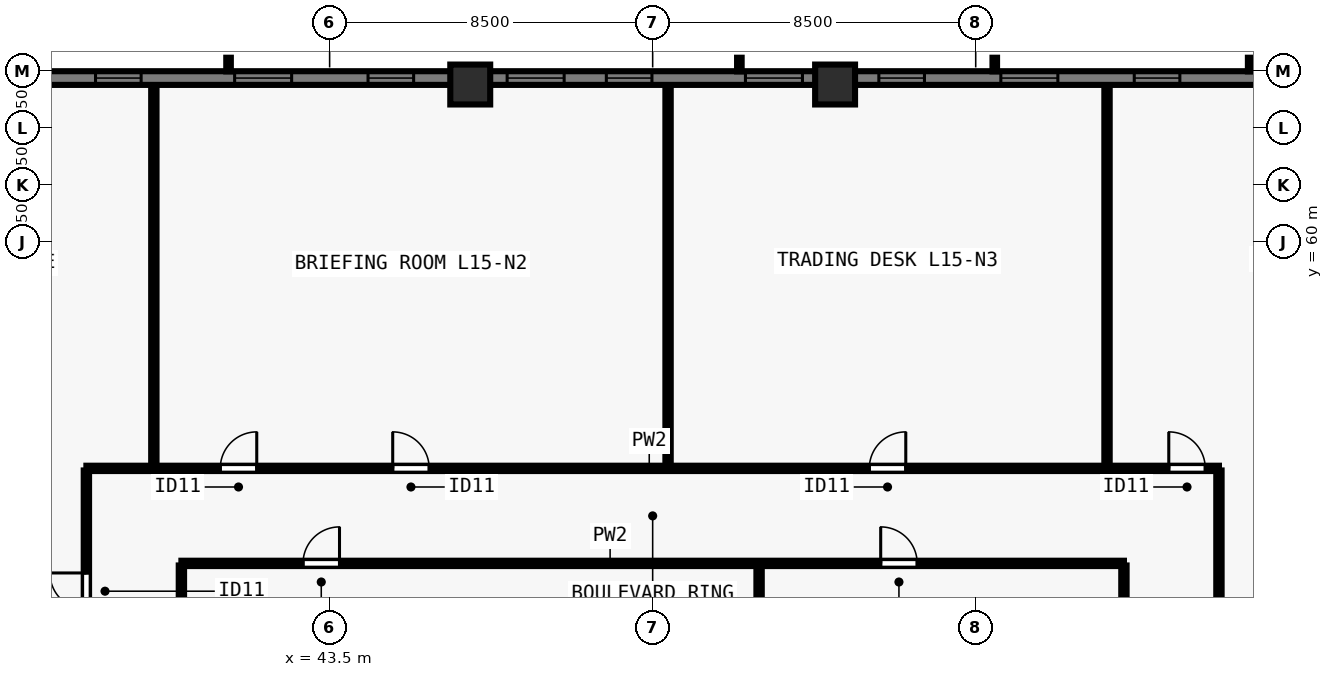
"""IFC4 building model, lengths in metres.
Left out: names, types, materials, properties, quantities, classifications, styles, units other than length and angle.
Written with IfcOpenShell. Run it as: python <this file> out.ifc"""

import sys

from ifc_helpers import new_model, si_unit, direction, frame, frame_2d, origin, origin_2d, place, context, subcontext, project, spatial, rectangle, extrude, element, fill, save


model = new_model("IFC4")
c1 = context("Model", 3, precision=1e-05, world=origin(), true_north=direction((0.0, 1.0)))
c2 = subcontext(c1, "Body", "Model", "MODEL_VIEW")
j1 = project(units=[si_unit("LENGTHUNIT", "METRE"), si_unit("PLANEANGLEUNIT", "RADIAN")], contexts=[c1])
p1 = place(None, origin())
s1 = spatial("IfcSite", under=j1, at=p1, CompositionType="ELEMENT")
p2 = place(p1, origin())
s2 = spatial("IfcBuilding", under=s1, at=p2, CompositionType="ELEMENT")
p3 = place(p2, frame((0.0, 0.0, 58.5)))
s3 = spatial("IfcBuildingStorey", under=s2, at=p3, CompositionType="ELEMENT", Elevation=58.5)
for number, where, z_axis, x_axis in (
    (1, (56.8, 64.15, 0.0), (0.0, 0.0, 1.0), (1.0, 0.0, 0.0)),
    (2, (47.2, 64.15, 0.0), (0.0, 0.0, 1.0), (1.0, 0.0, 0.0)),
):
    element("IfcColumn", number, at=place(p3, frame(where, z_axis=z_axis, x_axis=x_axis)), inside=s3, PredefinedType="COLUMN", context=c2, shape_type="SweptSolid", body=[
        extrude(rectangle(XDim=1.05, YDim=1.05, at=origin_2d()), origin(), (0.0, 0.0, 1.0), 3.5),
    ])
p4 = place(p3, frame((29.5, 64.32, 0.0), z_axis=(0.0, 0.0, 1.0), x_axis=(1.0, 0.0, 0.0)))
e3 = element("IfcWall", 3, at=p4, inside=s3, PredefinedType="SOLIDWALL", context=c2, shape_type="SweptSolid", body=[
    extrude(rectangle(XDim=44.662, YDim=0.36, at=frame_2d((22.331, 0.0))), origin(), (0.0, 0.0, 1.0), 3.28),
])
p5 = place(p4, frame((4.78, 0.0, 0.8)))
e4 = element("IfcOpeningElement", 4, at=p5, cuts=e3, PredefinedType="OPENING", context=c2, shape_type="SweptSolid", body=[
    extrude(rectangle(XDim=1.5, YDim=1.544, at=frame_2d((0.75, 0.772))), frame((0.0, 0.19, 0.0), z_axis=(0.0, -1.0, 0.0), x_axis=(1.0, 0.0, 0.0)), (0.0, 0.0, 1.0), 0.38),
])
p6 = place(p4, frame((7.84, 0.0, 0.8)))
e5 = element("IfcOpeningElement", 5, at=p6, cuts=e3, PredefinedType="OPENING", context=c2, shape_type="SweptSolid", body=[
    extrude(rectangle(XDim=1.2, YDim=1.544, at=frame_2d((0.6, 0.772))), frame((0.0, 0.19, 0.0), z_axis=(0.0, -1.0, 0.0), x_axis=(1.0, 0.0, 0.0)), (0.0, 0.0, 1.0), 0.38),
])
p7 = place(p4, frame((11.5, 0.0, 0.8)))
e6 = element("IfcOpeningElement", 6, at=p7, cuts=e3, PredefinedType="OPENING", context=c2, shape_type="SweptSolid", body=[
    extrude(rectangle(XDim=1.5, YDim=1.544, at=frame_2d((0.75, 0.772))), frame((0.0, 0.19, 0.0), z_axis=(0.0, -1.0, 0.0), x_axis=(1.0, 0.0, 0.0)), (0.0, 0.0, 1.0), 0.38),
])
p8 = place(p4, frame((15.01, 0.0, 0.8)))
e7 = element("IfcOpeningElement", 7, at=p8, cuts=e3, PredefinedType="OPENING", context=c2, shape_type="SweptSolid", body=[
    extrude(rectangle(XDim=1.2, YDim=1.544, at=frame_2d((0.6, 0.772))), frame((0.0, 0.19, 0.0), z_axis=(0.0, -1.0, 0.0), x_axis=(1.0, 0.0, 0.0)), (0.0, 0.0, 1.0), 0.38),
])
p9 = place(p4, frame((18.671, 0.0, 0.8)))
e8 = element("IfcOpeningElement", 8, at=p9, cuts=e3, PredefinedType="OPENING", context=c2, shape_type="SweptSolid", body=[
    extrude(rectangle(XDim=1.5, YDim=1.544, at=frame_2d((0.75, 0.772))), frame((0.0, 0.19, 0.0), z_axis=(0.0, -1.0, 0.0), x_axis=(1.0, 0.0, 0.0)), (0.0, 0.0, 1.0), 0.38),
])
p10 = place(p4, frame((21.281, 0.0, 0.8)))
e9 = element("IfcOpeningElement", 9, at=p10, cuts=e3, PredefinedType="OPENING", context=c2, shape_type="SweptSolid", body=[
    extrude(rectangle(XDim=1.2, YDim=1.544, at=frame_2d((0.6, 0.772))), frame((0.0, 0.19, 0.0), z_axis=(0.0, -1.0, 0.0), x_axis=(1.0, 0.0, 0.0)), (0.0, 0.0, 1.0), 0.38),
])
p11 = place(p4, frame((24.941, 0.0, 0.8)))
e10 = element("IfcOpeningElement", 10, at=p11, cuts=e3, PredefinedType="OPENING", context=c2, shape_type="SweptSolid", body=[
    extrude(rectangle(XDim=1.5, YDim=1.544, at=frame_2d((0.75, 0.772))), frame((0.0, 0.19, 0.0), z_axis=(0.0, -1.0, 0.0), x_axis=(1.0, 0.0, 0.0)), (0.0, 0.0, 1.0), 0.38),
])
p12 = place(p4, frame((28.451, 0.0, 0.8)))
e11 = element("IfcOpeningElement", 11, at=p12, cuts=e3, PredefinedType="OPENING", context=c2, shape_type="SweptSolid", body=[
    extrude(rectangle(XDim=1.2, YDim=1.544, at=frame_2d((0.6, 0.772))), frame((0.0, 0.19, 0.0), z_axis=(0.0, -1.0, 0.0), x_axis=(1.0, 0.0, 0.0)), (0.0, 0.0, 1.0), 0.38),
])
p13 = place(p4, frame((31.662, 0.0, 0.8)))
e12 = element("IfcOpeningElement", 12, at=p13, cuts=e3, PredefinedType="OPENING", context=c2, shape_type="SweptSolid", body=[
    extrude(rectangle(XDim=1.5, YDim=1.544, at=frame_2d((0.75, 0.772))), frame((0.0, 0.19, 0.0), z_axis=(0.0, -1.0, 0.0), x_axis=(1.0, 0.0, 0.0)), (0.0, 0.0, 1.0), 0.38),
])
p14 = place(p4, frame((35.172, 0.0, 0.8)))
e13 = element("IfcOpeningElement", 13, at=p14, cuts=e3, PredefinedType="OPENING", context=c2, shape_type="SweptSolid", body=[
    extrude(rectangle(XDim=1.2, YDim=1.544, at=frame_2d((0.6, 0.772))), frame((0.0, 0.19, 0.0), z_axis=(0.0, -1.0, 0.0), x_axis=(1.0, 0.0, 0.0)), (0.0, 0.0, 1.0), 0.38),
])
p15 = place(p4, frame((38.382, 0.0, 0.8)))
e14 = element("IfcOpeningElement", 14, at=p15, cuts=e3, PredefinedType="OPENING", context=c2, shape_type="SweptSolid", body=[
    extrude(rectangle(XDim=1.5, YDim=1.544, at=frame_2d((0.75, 0.772))), frame((0.0, 0.19, 0.0), z_axis=(0.0, -1.0, 0.0), x_axis=(1.0, 0.0, 0.0)), (0.0, 0.0, 1.0), 0.38),
])
p16 = place(p3, frame((37.1, 54.05, 0.0), z_axis=(0.0, 0.0, 1.0), x_axis=(1.0, 0.0, 0.0)))
e15 = element("IfcWall", 15, at=p16, inside=s3, PredefinedType="PARTITIONING", context=c2, shape_type="SweptSolid", body=[
    extrude(rectangle(XDim=29.8, YDim=0.14, at=frame_2d((14.9, 0.0))), origin(), (0.0, 0.0, 1.0), 3.28),
])
p17 = place(p16, frame((3.522, 0.0, 0.0)))
e16 = element("IfcOpeningElement", 16, at=p17, cuts=e15, PredefinedType="OPENING", context=c2, shape_type="SweptSolid", body=[
    extrude(rectangle(XDim=0.96, YDim=2.12, at=frame_2d((0.48, 1.06))), frame((0.0, 0.08, 0.0), z_axis=(0.0, -1.0, 0.0), x_axis=(1.0, 0.0, 0.0)), (0.0, 0.0, 1.0), 0.16),
])
p18 = place(p16, frame((8.06, 0.0, 0.0)))
e17 = element("IfcOpeningElement", 17, at=p18, cuts=e15, PredefinedType="OPENING", context=c2, shape_type="SweptSolid", body=[
    extrude(rectangle(XDim=0.96, YDim=2.12, at=frame_2d((0.48, 1.06))), frame((0.0, 0.08, 0.0), z_axis=(0.0, -1.0, 0.0), x_axis=(1.0, 0.0, 0.0)), (0.0, 0.0, 1.0), 0.16),
])
p19 = place(p16, frame((20.6, 0.0, 0.0)))
e18 = element("IfcOpeningElement", 18, at=p19, cuts=e15, PredefinedType="OPENING", context=c2, shape_type="SweptSolid", body=[
    extrude(rectangle(XDim=0.96, YDim=2.12, at=frame_2d((0.48, 1.06))), frame((0.0, 0.08, 0.0), z_axis=(0.0, -1.0, 0.0), x_axis=(1.0, 0.0, 0.0)), (0.0, 0.0, 1.0), 0.16),
])
p20 = place(p16, frame((28.48, 0.0, 0.0)))
e19 = element("IfcOpeningElement", 19, at=p20, cuts=e15, PredefinedType="OPENING", context=c2, shape_type="SweptSolid", body=[
    extrude(rectangle(XDim=0.96, YDim=2.12, at=frame_2d((0.48, 1.06))), frame((0.0, 0.08, 0.0), z_axis=(0.0, -1.0, 0.0), x_axis=(1.0, 0.0, 0.0)), (0.0, 0.0, 1.0), 0.16),
])
p21 = place(p3, frame((37.1, 24.005, 0.0), z_axis=(0.0, 0.0, 1.0), x_axis=(0.0, 1.0, 0.0)))
e20 = element("IfcWall", 20, at=p21, inside=s3, PredefinedType="PARTITIONING", context=c2, shape_type="SweptSolid", body=[
    extrude(rectangle(XDim=29.99, YDim=0.14, at=frame_2d((14.995, 0.0))), origin(), (0.0, 0.0, 1.0), 3.28),
])
p22 = place(p21, frame((2.76, 0.0, 0.0)))
e21 = element("IfcOpeningElement", 21, at=p22, cuts=e20, PredefinedType="OPENING", context=c2, shape_type="SweptSolid", body=[
    extrude(rectangle(XDim=0.96, YDim=2.12, at=frame_2d((0.48, 1.06))), frame((0.0, 0.08, 0.0), z_axis=(0.0, -1.0, 0.0), x_axis=(1.0, 0.0, 0.0)), (0.0, 0.0, 1.0), 0.16),
])
p23 = place(p21, frame((8.598, 0.0, 0.0)))
e22 = element("IfcOpeningElement", 22, at=p23, cuts=e20, PredefinedType="OPENING", context=c2, shape_type="SweptSolid", body=[
    extrude(rectangle(XDim=0.96, YDim=2.12, at=frame_2d((0.48, 1.06))), frame((0.0, 0.08, 0.0), z_axis=(0.0, -1.0, 0.0), x_axis=(1.0, 0.0, 0.0)), (0.0, 0.0, 1.0), 0.16),
])
p24 = place(p21, frame((14.578, 0.0, 0.0)))
e23 = element("IfcOpeningElement", 23, at=p24, cuts=e20, PredefinedType="OPENING", context=c2, shape_type="SweptSolid", body=[
    extrude(rectangle(XDim=0.96, YDim=2.12, at=frame_2d((0.48, 1.06))), frame((0.0, 0.08, 0.0), z_axis=(0.0, -1.0, 0.0), x_axis=(1.0, 0.0, 0.0)), (0.0, 0.0, 1.0), 0.16),
])
p25 = place(p21, frame((20.558, 0.0, 0.0)))
e24 = element("IfcOpeningElement", 24, at=p25, cuts=e20, PredefinedType="OPENING", context=c2, shape_type="SweptSolid", body=[
    extrude(rectangle(XDim=0.96, YDim=2.12, at=frame_2d((0.48, 1.06))), frame((0.0, 0.08, 0.0), z_axis=(0.0, -1.0, 0.0), x_axis=(1.0, 0.0, 0.0)), (0.0, 0.0, 1.0), 0.16),
])
p26 = place(p21, frame((26.333, 0.0, 0.0)))
e25 = element("IfcOpeningElement", 25, at=p26, cuts=e20, PredefinedType="OPENING", context=c2, shape_type="SweptSolid", body=[
    extrude(rectangle(XDim=0.96, YDim=2.12, at=frame_2d((0.48, 1.06))), frame((0.0, 0.08, 0.0), z_axis=(0.0, -1.0, 0.0), x_axis=(1.0, 0.0, 0.0)), (0.0, 0.0, 1.0), 0.16),
])
p27 = place(p3, frame((66.9, 24.005, 0.0), z_axis=(0.0, 0.0, 1.0), x_axis=(0.0, 1.0, 0.0)))
e26 = element("IfcWall", 26, at=p27, inside=s3, PredefinedType="PARTITIONING", context=c2, shape_type="SweptSolid", body=[
    extrude(rectangle(XDim=29.99, YDim=0.14, at=frame_2d((14.995, 0.0))), origin(), (0.0, 0.0, 1.0), 3.28),
])
p28 = place(p27, frame((4.344, 0.0, 0.0)))
e27 = element("IfcOpeningElement", 27, at=p28, cuts=e26, PredefinedType="OPENING", context=c2, shape_type="SweptSolid", body=[
    extrude(rectangle(XDim=0.96, YDim=2.12, at=frame_2d((0.48, 1.06))), frame((0.0, 0.08, 0.0), z_axis=(0.0, -1.0, 0.0), x_axis=(1.0, 0.0, 0.0)), (0.0, 0.0, 1.0), 0.16),
])
p29 = place(p27, frame((14.452, 0.0, 0.0)))
e28 = element("IfcOpeningElement", 28, at=p29, cuts=e26, PredefinedType="OPENING", context=c2, shape_type="SweptSolid", body=[
    extrude(rectangle(XDim=0.96, YDim=2.12, at=frame_2d((0.48, 1.06))), frame((0.0, 0.08, 0.0), z_axis=(0.0, -1.0, 0.0), x_axis=(1.0, 0.0, 0.0)), (0.0, 0.0, 1.0), 0.16),
])
p30 = place(p27, frame((24.623, 0.0, 0.0)))
e29 = element("IfcOpeningElement", 29, at=p30, cuts=e26, PredefinedType="OPENING", context=c2, shape_type="SweptSolid", body=[
    extrude(rectangle(XDim=0.96, YDim=2.12, at=frame_2d((0.48, 1.06))), frame((0.0, 0.08, 0.0), z_axis=(0.0, -1.0, 0.0), x_axis=(1.0, 0.0, 0.0)), (0.0, 0.0, 1.0), 0.16),
])
p31 = place(p3, frame((39.6, 51.55, 0.0), z_axis=(0.0, 0.0, 1.0), x_axis=(1.0, 0.0, 0.0)))
e30 = element("IfcWall", 30, at=p31, inside=s3, PredefinedType="PARTITIONING", context=c2, shape_type="SweptSolid", body=[
    extrude(rectangle(XDim=24.8, YDim=0.14, at=frame_2d((12.4, 0.0))), origin(), (0.0, 0.0, 1.0), 3.28),
])
p32 = place(p31, frame((3.2, 0.0, 0.0)))
e31 = element("IfcOpeningElement", 31, at=p32, cuts=e30, PredefinedType="OPENING", context=c2, shape_type="SweptSolid", body=[
    extrude(rectangle(XDim=0.96, YDim=2.12, at=frame_2d((0.48, 1.06))), frame((0.0, 0.08, 0.0), z_axis=(0.0, -1.0, 0.0), x_axis=(1.0, 0.0, 0.0)), (0.0, 0.0, 1.0), 0.16),
])
p33 = place(p31, frame((18.4, 0.0, 0.0)))
e32 = element("IfcOpeningElement", 32, at=p33, cuts=e30, PredefinedType="OPENING", context=c2, shape_type="SweptSolid", body=[
    extrude(rectangle(XDim=0.96, YDim=2.12, at=frame_2d((0.48, 1.06))), frame((0.0, 0.08, 0.0), z_axis=(0.0, -1.0, 0.0), x_axis=(1.0, 0.0, 0.0)), (0.0, 0.0, 1.0), 0.16),
])
p34 = place(p3, frame((39.6, 40.8, 0.0), z_axis=(0.0, 0.0, 1.0), x_axis=(0.0, 1.0, 0.0)))
e33 = element("IfcWall", 33, at=p34, inside=s3, PredefinedType="PARTITIONING", context=c2, shape_type="SweptSolid", body=[
    extrude(rectangle(XDim=10.695, YDim=0.14, at=frame_2d((5.348, 0.0))), origin(), (0.0, 0.0, 1.0), 3.28),
])
p35 = place(p34, frame((2.5, 0.0, 0.0)))
e34 = element("IfcOpeningElement", 34, at=p35, cuts=e33, PredefinedType="OPENING", context=c2, shape_type="SweptSolid", body=[
    extrude(rectangle(XDim=0.88, YDim=2.1, at=frame_2d((0.44, 1.05))), frame((0.0, 0.08, 0.0), z_axis=(0.0, -1.0, 0.0), x_axis=(1.0, 0.0, 0.0)), (0.0, 0.0, 1.0), 0.16),
])
p36 = place(p3, frame((64.4, 40.8, 0.0), z_axis=(0.0, 0.0, 1.0), x_axis=(0.0, 1.0, 0.0)))
e35 = element("IfcWall", 35, at=p36, inside=s3, PredefinedType="PARTITIONING", context=c2, shape_type="SweptSolid", body=[
    extrude(rectangle(XDim=10.695, YDim=0.14, at=frame_2d((5.348, 0.0))), origin(), (0.0, 0.0, 1.0), 3.28),
])
p37 = place(p36, frame((2.5, 0.0, 0.0)))
e36 = element("IfcOpeningElement", 36, at=p37, cuts=e35, PredefinedType="OPENING", context=c2, shape_type="SweptSolid", body=[
    extrude(rectangle(XDim=0.88, YDim=2.1, at=frame_2d((0.44, 1.05))), frame((0.0, 0.08, 0.0), z_axis=(0.0, -1.0, 0.0), x_axis=(1.0, 0.0, 0.0)), (0.0, 0.0, 1.0), 0.16),
])
p38 = place(p3, frame((54.8, 47.76, 0.0), z_axis=(0.0, 0.0, 1.0), x_axis=(0.0, 1.0, 0.0)))
e37 = element("IfcWall", 37, at=p38, inside=s3, PredefinedType="PARTITIONING", context=c2, shape_type="SweptSolid", body=[
    extrude(rectangle(XDim=3.735, YDim=0.14, at=frame_2d((1.868, 0.0))), origin(), (0.0, 0.0, 1.0), 3.28),
])
p39 = place(p3, frame((38.875, 54.15, 0.0), z_axis=(0.0, 0.0, 1.0), x_axis=(0.0, 1.0, 0.0)))
e38 = element("IfcWall", 38, at=p39, inside=s3, PredefinedType="PARTITIONING", context=c2, shape_type="SweptSolid", body=[
    extrude(rectangle(XDim=9.93, YDim=0.14, at=frame_2d((4.965, 0.0))), origin(), (0.0, 0.0, 1.0), 3.28),
])
p40 = place(p3, frame((52.405, 54.15, 0.0), z_axis=(0.0, 0.0, 1.0), x_axis=(0.0, 1.0, 0.0)))
e39 = element("IfcWall", 39, at=p40, inside=s3, PredefinedType="PARTITIONING", context=c2, shape_type="SweptSolid", body=[
    extrude(rectangle(XDim=9.93, YDim=0.14, at=frame_2d((4.965, 0.0))), origin(), (0.0, 0.0, 1.0), 2.849),
])
p41 = place(p3, frame((63.955, 54.15, 0.0), z_axis=(0.0, 0.0, 1.0), x_axis=(0.0, 1.0, 0.0)))
e40 = element("IfcWall", 40, at=p41, inside=s3, PredefinedType="PARTITIONING", context=c2, shape_type="SweptSolid", body=[
    extrude(rectangle(XDim=9.93, YDim=0.14, at=frame_2d((4.965, 0.0))), origin(), (0.0, 0.0, 1.0), 3.28),
])
p42 = place(p6, origin())
e41 = element("IfcWindow", 41, at=p42, inside=s3, PartitioningType="SINGLE_PANEL", PredefinedType="WINDOW", context=c2, shape_type="SweptSolid", body=[
    extrude(rectangle(XDim=1.2, YDim=1.544, at=frame_2d((0.6, 0.772))), frame((0.0, -0.05, 0.0), z_axis=(0.0, -1.0, 0.0), x_axis=(1.0, 0.0, 0.0)), (0.0, 0.0, 1.0), 0.06),
])
fill(e5, e41)
p43 = place(p7, origin())
e42 = element("IfcWindow", 42, at=p43, inside=s3, PartitioningType="SINGLE_PANEL", PredefinedType="WINDOW", context=c2, shape_type="SweptSolid", body=[
    extrude(rectangle(XDim=1.5, YDim=1.544, at=frame_2d((0.75, 0.772))), frame((0.0, -0.05, 0.0), z_axis=(0.0, -1.0, 0.0), x_axis=(1.0, 0.0, 0.0)), (0.0, 0.0, 1.0), 0.06),
])
fill(e6, e42)
p44 = place(p8, origin())
e43 = element("IfcWindow", 43, at=p44, inside=s3, PartitioningType="SINGLE_PANEL", PredefinedType="WINDOW", context=c2, shape_type="SweptSolid", body=[
    extrude(rectangle(XDim=1.2, YDim=1.544, at=frame_2d((0.6, 0.772))), frame((0.0, -0.05, 0.0), z_axis=(0.0, -1.0, 0.0), x_axis=(1.0, 0.0, 0.0)), (0.0, 0.0, 1.0), 0.06),
])
fill(e7, e43)
p45 = place(p9, origin())
e44 = element("IfcWindow", 44, at=p45, inside=s3, PartitioningType="SINGLE_PANEL", PredefinedType="WINDOW", context=c2, shape_type="SweptSolid", body=[
    extrude(rectangle(XDim=1.5, YDim=1.544, at=frame_2d((0.75, 0.772))), frame((0.0, -0.05, 0.0), z_axis=(0.0, -1.0, 0.0), x_axis=(1.0, 0.0, 0.0)), (0.0, 0.0, 1.0), 0.06),
])
fill(e8, e44)
p46 = place(p10, origin())
e45 = element("IfcWindow", 45, at=p46, inside=s3, PartitioningType="SINGLE_PANEL", PredefinedType="WINDOW", context=c2, shape_type="SweptSolid", body=[
    extrude(rectangle(XDim=1.2, YDim=1.544, at=frame_2d((0.6, 0.772))), frame((0.0, -0.05, 0.0), z_axis=(0.0, -1.0, 0.0), x_axis=(1.0, 0.0, 0.0)), (0.0, 0.0, 1.0), 0.06),
])
fill(e9, e45)
p47 = place(p11, origin())
e46 = element("IfcWindow", 46, at=p47, inside=s3, PartitioningType="SINGLE_PANEL", PredefinedType="WINDOW", context=c2, shape_type="SweptSolid", body=[
    extrude(rectangle(XDim=1.5, YDim=1.544, at=frame_2d((0.75, 0.772))), frame((0.0, -0.05, 0.0), z_axis=(0.0, -1.0, 0.0), x_axis=(1.0, 0.0, 0.0)), (0.0, 0.0, 1.0), 0.06),
])
fill(e10, e46)
p48 = place(p12, origin())
e47 = element("IfcWindow", 47, at=p48, inside=s3, PartitioningType="SINGLE_PANEL", PredefinedType="WINDOW", context=c2, shape_type="SweptSolid", body=[
    extrude(rectangle(XDim=1.2, YDim=1.544, at=frame_2d((0.6, 0.772))), frame((0.0, -0.05, 0.0), z_axis=(0.0, -1.0, 0.0), x_axis=(1.0, 0.0, 0.0)), (0.0, 0.0, 1.0), 0.06),
])
fill(e11, e47)
p49 = place(p13, origin())
e48 = element("IfcWindow", 48, at=p49, inside=s3, PartitioningType="SINGLE_PANEL", PredefinedType="WINDOW", context=c2, shape_type="SweptSolid", body=[
    extrude(rectangle(XDim=1.5, YDim=1.544, at=frame_2d((0.75, 0.772))), frame((0.0, -0.05, 0.0), z_axis=(0.0, -1.0, 0.0), x_axis=(1.0, 0.0, 0.0)), (0.0, 0.0, 1.0), 0.06),
])
fill(e12, e48)
p50 = place(p14, origin())
e49 = element("IfcWindow", 49, at=p50, inside=s3, PartitioningType="SINGLE_PANEL", PredefinedType="WINDOW", context=c2, shape_type="SweptSolid", body=[
    extrude(rectangle(XDim=1.2, YDim=1.544, at=frame_2d((0.6, 0.772))), frame((0.0, -0.05, 0.0), z_axis=(0.0, -1.0, 0.0), x_axis=(1.0, 0.0, 0.0)), (0.0, 0.0, 1.0), 0.06),
])
fill(e13, e49)
p51 = place(p32, origin())
e50 = element("IfcDoor", 50, at=p51, inside=s3, OperationType="SINGLE_SWING_RIGHT", PredefinedType="DOOR", context=c2, shape_type="SweptSolid", body=[
    extrude(rectangle(XDim=0.96, YDim=2.12, at=frame_2d((0.48, 1.06))), frame((0.0, 0.025, 0.0), z_axis=(0.0, -1.0, 0.0), x_axis=(1.0, 0.0, 0.0)), (0.0, 0.0, 1.0), 0.05),
])
fill(e31, e50)
p52 = place(p33, origin())
e51 = element("IfcDoor", 51, at=p52, inside=s3, OperationType="SINGLE_SWING_LEFT", PredefinedType="DOOR", context=c2, shape_type="SweptSolid", body=[
    extrude(rectangle(XDim=0.96, YDim=2.12, at=frame_2d((0.48, 1.06))), frame((0.0, 0.025, 0.0), z_axis=(0.0, -1.0, 0.0), x_axis=(1.0, 0.0, 0.0)), (0.0, 0.0, 1.0), 0.05),
])
fill(e32, e51)
p53 = place(p17, origin())
e52 = element("IfcDoor", 52, at=p53, inside=s3, OperationType="SINGLE_SWING_RIGHT", PredefinedType="DOOR", context=c2, shape_type="SweptSolid", body=[
    extrude(rectangle(XDim=0.96, YDim=2.12, at=frame_2d((0.48, 1.06))), frame((0.0, 0.025, 0.0), z_axis=(0.0, -1.0, 0.0), x_axis=(1.0, 0.0, 0.0)), (0.0, 0.0, 1.0), 0.05),
])
fill(e16, e52)
p54 = place(p18, origin())
e53 = element("IfcDoor", 53, at=p54, inside=s3, OperationType="SINGLE_SWING_LEFT", PredefinedType="DOOR", context=c2, shape_type="SweptSolid", body=[
    extrude(rectangle(XDim=0.96, YDim=2.12, at=frame_2d((0.48, 1.06))), frame((0.0, 0.025, 0.0), z_axis=(0.0, -1.0, 0.0), x_axis=(1.0, 0.0, 0.0)), (0.0, 0.0, 1.0), 0.05),
])
fill(e17, e53)
p55 = place(p19, origin())
e54 = element("IfcDoor", 54, at=p55, inside=s3, OperationType="SINGLE_SWING_RIGHT", PredefinedType="DOOR", context=c2, shape_type="SweptSolid", body=[
    extrude(rectangle(XDim=0.96, YDim=2.12, at=frame_2d((0.48, 1.06))), frame((0.0, 0.025, 0.0), z_axis=(0.0, -1.0, 0.0), x_axis=(1.0, 0.0, 0.0)), (0.0, 0.0, 1.0), 0.05),
])
fill(e18, e54)
p56 = place(p20, origin())
e55 = element("IfcDoor", 55, at=p56, inside=s3, OperationType="SINGLE_SWING_LEFT", PredefinedType="DOOR", context=c2, shape_type="SweptSolid", body=[
    extrude(rectangle(XDim=0.96, YDim=2.12, at=frame_2d((0.48, 1.06))), frame((0.0, 0.025, 0.0), z_axis=(0.0, -1.0, 0.0), x_axis=(1.0, 0.0, 0.0)), (0.0, 0.0, 1.0), 0.05),
])
fill(e19, e55)
p57 = place(p26, origin())
e56 = element("IfcDoor", 56, at=p57, inside=s3, OperationType="SINGLE_SWING_RIGHT", PredefinedType="DOOR", context=c2, shape_type="SweptSolid", body=[
    extrude(rectangle(XDim=0.96, YDim=2.12, at=frame_2d((0.48, 1.06))), frame((0.0, 0.025, 0.0), z_axis=(0.0, -1.0, 0.0), x_axis=(1.0, 0.0, 0.0)), (0.0, 0.0, 1.0), 0.05),
])
fill(e25, e56)
save(model, sys.argv[1])
